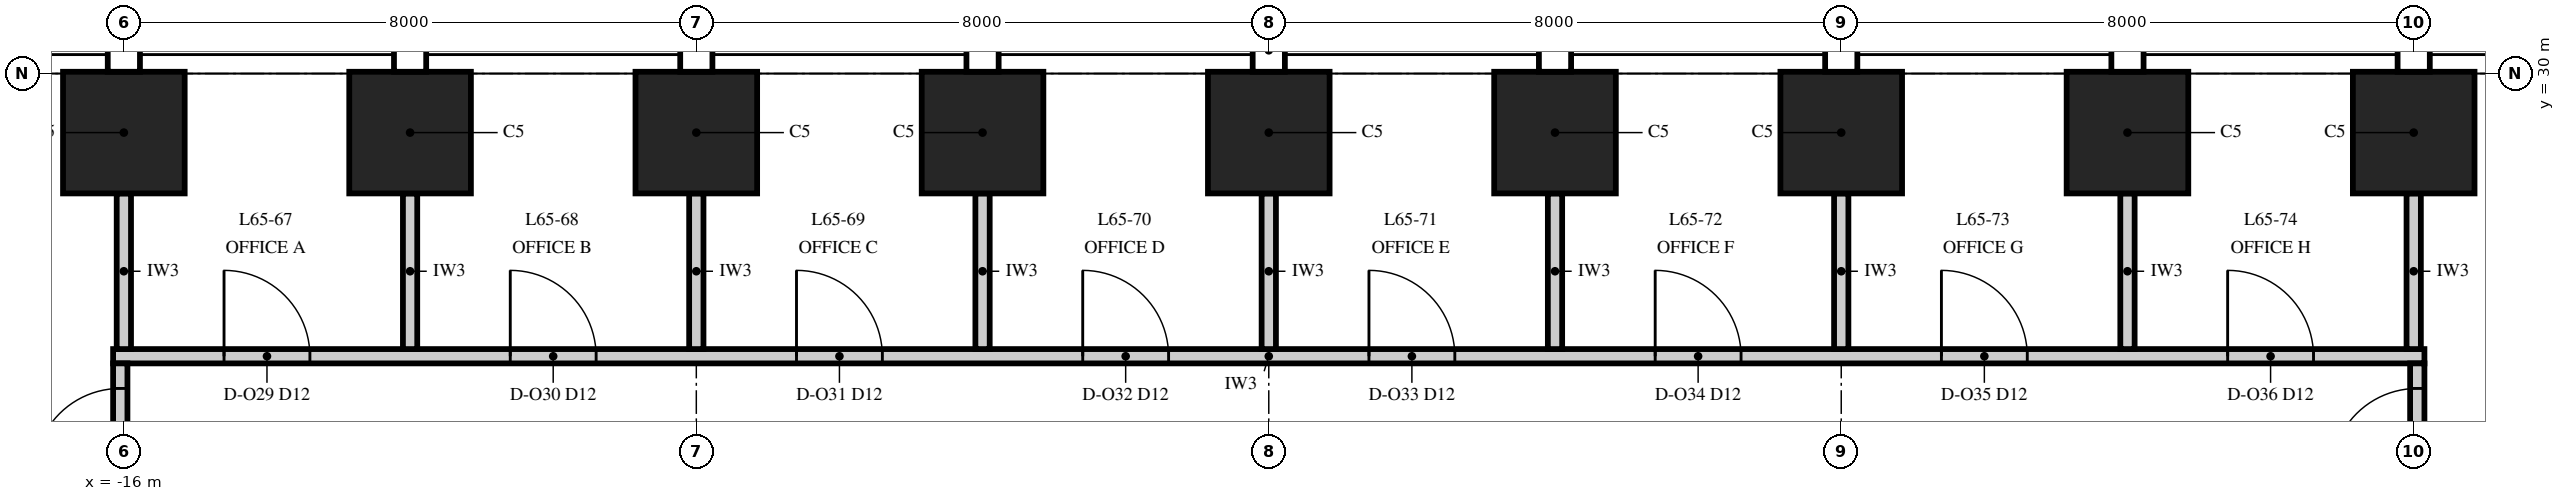
"""IFC4 building model, lengths in metres.
Left out: names, types, materials, properties, quantities, classifications, styles, units other than length and angle.
Written with IfcOpenShell. Run it as: python <this file> out.ifc"""

import sys

from ifc_helpers import new_model, si_unit, direction, frame, frame_2d, origin, origin_2d, place, context, subcontext, project, spatial, rectangle, extrude, element, fill, save


model = new_model("IFC4")
c1 = context("Model", 3, precision=1e-05, world=origin(), true_north=direction((0.0, 1.0)))
c2 = subcontext(c1, "Body", "Model", "MODEL_VIEW")
j1 = project(units=[si_unit("LENGTHUNIT", "METRE"), si_unit("PLANEANGLEUNIT", "RADIAN")], contexts=[c1])
p1 = place(None, origin())
s1 = spatial("IfcSite", under=j1, at=p1, CompositionType="ELEMENT")
p2 = place(p1, origin())
s2 = spatial("IfcBuilding", under=s1, at=p2, CompositionType="ELEMENT")
p3 = place(p2, frame((0.0, 0.0, 280.0)))
s3 = spatial("IfcBuildingStorey", under=s2, at=p3, CompositionType="ELEMENT", Elevation=280.0)
for number, where, z_axis, x_axis in (
    (1, (16.0, 29.175, 0.0), (0.0, 0.0, 1.0), (-1.0, 0.0, 0.0)),
    (2, (12.0, 29.175, 0.0), (0.0, 0.0, 1.0), (-1.0, 0.0, 0.0)),
    (3, (8.0, 29.175, 0.0), (0.0, 0.0, 1.0), (-1.0, 0.0, 0.0)),
    (4, (4.0, 29.175, 0.0), (0.0, 0.0, 1.0), (-1.0, 0.0, 0.0)),
    (5, (0.0, 29.175, 0.0), (0.0, 0.0, 1.0), (-1.0, 0.0, 0.0)),
    (6, (-4.0, 29.175, 0.0), (0.0, 0.0, 1.0), (-1.0, 0.0, 0.0)),
    (7, (-8.0, 29.175, 0.0), (0.0, 0.0, 1.0), (-1.0, 0.0, 0.0)),
    (8, (-12.0, 29.175, 0.0), (0.0, 0.0, 1.0), (-1.0, 0.0, 0.0)),
    (9, (-16.0, 29.175, 0.0), (0.0, 0.0, 1.0), (-1.0, 0.0, 0.0)),
):
    element("IfcColumn", number, at=place(p3, frame(where, z_axis=z_axis, x_axis=x_axis)), inside=s3, PredefinedType="COLUMN", context=c2, shape_type="SweptSolid", body=[
        extrude(rectangle(XDim=1.7, YDim=1.7, at=origin_2d()), origin(), (0.0, 0.0, 1.0), 4.0),
    ])
p4 = place(p3, frame((-16.15, 26.05, 0.0), z_axis=(0.0, 0.0, 1.0), x_axis=(1.0, 0.0, 0.0)))
e10 = element("IfcWall", 10, at=p4, inside=s3, PredefinedType="PARTITIONING", context=c2, shape_type="SweptSolid", body=[
    extrude(rectangle(XDim=32.3, YDim=0.2, at=frame_2d((16.15, 0.0))), origin(), (0.0, 0.0, 1.0), 3.418),
])
p5 = place(p4, frame((1.55, 0.0, 0.0)))
e11 = element("IfcOpeningElement", 11, at=p5, cuts=e10, PredefinedType="OPENING", context=c2, shape_type="SweptSolid", body=[
    extrude(rectangle(XDim=1.2, YDim=2.4, at=frame_2d((0.6, 1.2))), frame((0.0, 0.115, 0.0), z_axis=(0.0, -1.0, 0.0), x_axis=(1.0, 0.0, 0.0)), (0.0, 0.0, 1.0), 0.23),
])
p6 = place(p4, frame((5.55, 0.0, 0.0)))
e12 = element("IfcOpeningElement", 12, at=p6, cuts=e10, PredefinedType="OPENING", context=c2, shape_type="SweptSolid", body=[
    extrude(rectangle(XDim=1.2, YDim=2.4, at=frame_2d((0.6, 1.2))), frame((0.0, 0.115, 0.0), z_axis=(0.0, -1.0, 0.0), x_axis=(1.0, 0.0, 0.0)), (0.0, 0.0, 1.0), 0.23),
])
p7 = place(p4, frame((9.55, 0.0, 0.0)))
e13 = element("IfcOpeningElement", 13, at=p7, cuts=e10, PredefinedType="OPENING", context=c2, shape_type="SweptSolid", body=[
    extrude(rectangle(XDim=1.2, YDim=2.4, at=frame_2d((0.6, 1.2))), frame((0.0, 0.115, 0.0), z_axis=(0.0, -1.0, 0.0), x_axis=(1.0, 0.0, 0.0)), (0.0, 0.0, 1.0), 0.23),
])
p8 = place(p4, frame((13.55, 0.0, 0.0)))
e14 = element("IfcOpeningElement", 14, at=p8, cuts=e10, PredefinedType="OPENING", context=c2, shape_type="SweptSolid", body=[
    extrude(rectangle(XDim=1.2, YDim=2.4, at=frame_2d((0.6, 1.2))), frame((0.0, 0.115, 0.0), z_axis=(0.0, -1.0, 0.0), x_axis=(1.0, 0.0, 0.0)), (0.0, 0.0, 1.0), 0.23),
])
p9 = place(p4, frame((17.55, 0.0, 0.0)))
e15 = element("IfcOpeningElement", 15, at=p9, cuts=e10, PredefinedType="OPENING", context=c2, shape_type="SweptSolid", body=[
    extrude(rectangle(XDim=1.2, YDim=2.4, at=frame_2d((0.6, 1.2))), frame((0.0, 0.115, 0.0), z_axis=(0.0, -1.0, 0.0), x_axis=(1.0, 0.0, 0.0)), (0.0, 0.0, 1.0), 0.23),
])
p10 = place(p4, frame((21.55, 0.0, 0.0)))
e16 = element("IfcOpeningElement", 16, at=p10, cuts=e10, PredefinedType="OPENING", context=c2, shape_type="SweptSolid", body=[
    extrude(rectangle(XDim=1.2, YDim=2.4, at=frame_2d((0.6, 1.2))), frame((0.0, 0.115, 0.0), z_axis=(0.0, -1.0, 0.0), x_axis=(1.0, 0.0, 0.0)), (0.0, 0.0, 1.0), 0.23),
])
p11 = place(p4, frame((25.55, 0.0, 0.0)))
e17 = element("IfcOpeningElement", 17, at=p11, cuts=e10, PredefinedType="OPENING", context=c2, shape_type="SweptSolid", body=[
    extrude(rectangle(XDim=1.2, YDim=2.4, at=frame_2d((0.6, 1.2))), frame((0.0, 0.115, 0.0), z_axis=(0.0, -1.0, 0.0), x_axis=(1.0, 0.0, 0.0)), (0.0, 0.0, 1.0), 0.23),
])
p12 = place(p4, frame((29.55, 0.0, 0.0)))
e18 = element("IfcOpeningElement", 18, at=p12, cuts=e10, PredefinedType="OPENING", context=c2, shape_type="SweptSolid", body=[
    extrude(rectangle(XDim=1.2, YDim=2.4, at=frame_2d((0.6, 1.2))), frame((0.0, 0.115, 0.0), z_axis=(0.0, -1.0, 0.0), x_axis=(1.0, 0.0, 0.0)), (0.0, 0.0, 1.0), 0.23),
])
p13 = place(p3, frame((-16.05, 1.94, 0.0), z_axis=(0.0, 0.0, 1.0), x_axis=(0.0, 1.0, 0.0)))
e19 = element("IfcWall", 19, at=p13, inside=s3, PredefinedType="PARTITIONING", context=c2, shape_type="SweptSolid", body=[
    extrude(rectangle(XDim=24.01, YDim=0.2, at=frame_2d((12.005, 0.0))), origin(), (0.0, 0.0, 1.0), 2.842),
])
p14 = place(p13, frame((8.46, 0.0, 0.0)))
e20 = element("IfcOpeningElement", 20, at=p14, cuts=e19, PredefinedType="OPENING", context=c2, shape_type="SweptSolid", body=[
    extrude(rectangle(XDim=1.2, YDim=2.4, at=frame_2d((0.6, 1.2))), frame((0.0, 0.115, 0.0), z_axis=(0.0, -1.0, 0.0), x_axis=(1.0, 0.0, 0.0)), (0.0, 0.0, 1.0), 0.23),
])
p15 = place(p13, frame((22.46, 0.0, 0.0)))
e21 = element("IfcOpeningElement", 21, at=p15, cuts=e19, PredefinedType="OPENING", context=c2, shape_type="SweptSolid", body=[
    extrude(rectangle(XDim=1.2, YDim=2.4, at=frame_2d((0.6, 1.2))), frame((0.0, 0.115, 0.0), z_axis=(0.0, -1.0, 0.0), x_axis=(1.0, 0.0, 0.0)), (0.0, 0.0, 1.0), 0.23),
])
for number, where, z_axis, x_axis in (
    (22, (-16.0, 26.15, 0.0), (0.0, 0.0, 1.0), (0.0, 1.0, 0.0)),
    (23, (-12.0, 26.15, 0.0), (0.0, 0.0, 1.0), (0.0, 1.0, 0.0)),
    (24, (-8.0, 26.15, 0.0), (0.0, 0.0, 1.0), (0.0, 1.0, 0.0)),
    (25, (-4.0, 26.15, 0.0), (0.0, 0.0, 1.0), (0.0, 1.0, 0.0)),
    (26, (0.0, 26.15, 0.0), (0.0, 0.0, 1.0), (0.0, 1.0, 0.0)),
    (27, (4.0, 26.15, 0.0), (0.0, 0.0, 1.0), (0.0, 1.0, 0.0)),
    (28, (8.0, 26.15, 0.0), (0.0, 0.0, 1.0), (0.0, 1.0, 0.0)),
    (29, (12.0, 26.15, 0.0), (0.0, 0.0, 1.0), (0.0, 1.0, 0.0)),
    (30, (16.0, 26.15, 0.0), (0.0, 0.0, 1.0), (0.0, 1.0, 0.0)),
):
    element("IfcWall", number, at=place(p3, frame(where, z_axis=z_axis, x_axis=x_axis)), inside=s3, PredefinedType="PARTITIONING", context=c2, shape_type="SweptSolid", body=[
        extrude(rectangle(XDim=2.175, YDim=0.2, at=frame_2d((1.087, 0.0))), origin(), (0.0, 0.0, 1.0), 3.418),
    ])
p16 = place(p3, frame((16.05, 1.94, 0.0), z_axis=(0.0, 0.0, 1.0), x_axis=(0.0, 1.0, 0.0)))
e31 = element("IfcWall", 31, at=p16, inside=s3, PredefinedType="PARTITIONING", context=c2, shape_type="SweptSolid", body=[
    extrude(rectangle(XDim=24.01, YDim=0.2, at=frame_2d((12.005, 0.0))), origin(), (0.0, 0.0, 1.0), 2.842),
])
p17 = place(p16, frame((8.46, 0.0, 0.0)))
e32 = element("IfcOpeningElement", 32, at=p17, cuts=e31, PredefinedType="OPENING", context=c2, shape_type="SweptSolid", body=[
    extrude(rectangle(XDim=1.2, YDim=2.4, at=frame_2d((0.6, 1.2))), frame((0.0, 0.115, 0.0), z_axis=(0.0, -1.0, 0.0), x_axis=(1.0, 0.0, 0.0)), (0.0, 0.0, 1.0), 0.23),
])
p18 = place(p16, frame((22.46, 0.0, 0.0)))
e33 = element("IfcOpeningElement", 33, at=p18, cuts=e31, PredefinedType="OPENING", context=c2, shape_type="SweptSolid", body=[
    extrude(rectangle(XDim=1.2, YDim=2.4, at=frame_2d((0.6, 1.2))), frame((0.0, 0.115, 0.0), z_axis=(0.0, -1.0, 0.0), x_axis=(1.0, 0.0, 0.0)), (0.0, 0.0, 1.0), 0.23),
])
p19 = place(p5, origin())
e34 = element("IfcDoor", 34, at=p19, inside=s3, OperationType="SINGLE_SWING_LEFT", PredefinedType="DOOR", context=c2, shape_type="SweptSolid", body=[
    extrude(rectangle(XDim=1.2, YDim=2.4, at=frame_2d((0.6, 1.2))), frame((0.0, 0.1, 0.0), z_axis=(0.0, -1.0, 0.0), x_axis=(1.0, 0.0, 0.0)), (0.0, 0.0, 1.0), 0.199),
])
fill(e11, e34)
p20 = place(p6, origin())
e35 = element("IfcDoor", 35, at=p20, inside=s3, OperationType="SINGLE_SWING_LEFT", PredefinedType="DOOR", context=c2, shape_type="SweptSolid", body=[
    extrude(rectangle(XDim=1.2, YDim=2.4, at=frame_2d((0.6, 1.2))), frame((0.0, 0.1, 0.0), z_axis=(0.0, -1.0, 0.0), x_axis=(1.0, 0.0, 0.0)), (0.0, 0.0, 1.0), 0.199),
])
fill(e12, e35)
p21 = place(p7, origin())
e36 = element("IfcDoor", 36, at=p21, inside=s3, OperationType="SINGLE_SWING_LEFT", PredefinedType="DOOR", context=c2, shape_type="SweptSolid", body=[
    extrude(rectangle(XDim=1.2, YDim=2.4, at=frame_2d((0.6, 1.2))), frame((0.0, 0.1, 0.0), z_axis=(0.0, -1.0, 0.0), x_axis=(1.0, 0.0, 0.0)), (0.0, 0.0, 1.0), 0.199),
])
fill(e13, e36)
p22 = place(p8, origin())
e37 = element("IfcDoor", 37, at=p22, inside=s3, OperationType="SINGLE_SWING_LEFT", PredefinedType="DOOR", context=c2, shape_type="SweptSolid", body=[
    extrude(rectangle(XDim=1.2, YDim=2.4, at=frame_2d((0.6, 1.2))), frame((0.0, 0.1, 0.0), z_axis=(0.0, -1.0, 0.0), x_axis=(1.0, 0.0, 0.0)), (0.0, 0.0, 1.0), 0.199),
])
fill(e14, e37)
p23 = place(p9, origin())
e38 = element("IfcDoor", 38, at=p23, inside=s3, OperationType="SINGLE_SWING_LEFT", PredefinedType="DOOR", context=c2, shape_type="SweptSolid", body=[
    extrude(rectangle(XDim=1.2, YDim=2.4, at=frame_2d((0.6, 1.2))), frame((0.0, 0.1, 0.0), z_axis=(0.0, -1.0, 0.0), x_axis=(1.0, 0.0, 0.0)), (0.0, 0.0, 1.0), 0.199),
])
fill(e15, e38)
p24 = place(p10, origin())
e39 = element("IfcDoor", 39, at=p24, inside=s3, OperationType="SINGLE_SWING_LEFT", PredefinedType="DOOR", context=c2, shape_type="SweptSolid", body=[
    extrude(rectangle(XDim=1.2, YDim=2.4, at=frame_2d((0.6, 1.2))), frame((0.0, 0.1, 0.0), z_axis=(0.0, -1.0, 0.0), x_axis=(1.0, 0.0, 0.0)), (0.0, 0.0, 1.0), 0.199),
])
fill(e16, e39)
p25 = place(p11, origin())
e40 = element("IfcDoor", 40, at=p25, inside=s3, OperationType="SINGLE_SWING_LEFT", PredefinedType="DOOR", context=c2, shape_type="SweptSolid", body=[
    extrude(rectangle(XDim=1.2, YDim=2.4, at=frame_2d((0.6, 1.2))), frame((0.0, 0.1, 0.0), z_axis=(0.0, -1.0, 0.0), x_axis=(1.0, 0.0, 0.0)), (0.0, 0.0, 1.0), 0.199),
])
fill(e17, e40)
p26 = place(p12, origin())
e41 = element("IfcDoor", 41, at=p26, inside=s3, OperationType="SINGLE_SWING_LEFT", PredefinedType="DOOR", context=c2, shape_type="SweptSolid", body=[
    extrude(rectangle(XDim=1.2, YDim=2.4, at=frame_2d((0.6, 1.2))), frame((0.0, 0.1, 0.0), z_axis=(0.0, -1.0, 0.0), x_axis=(1.0, 0.0, 0.0)), (0.0, 0.0, 1.0), 0.199),
])
fill(e18, e41)
p27 = place(p15, origin())
e42 = element("IfcDoor", 42, at=p27, inside=s3, OperationType="SINGLE_SWING_LEFT", PredefinedType="DOOR", context=c2, shape_type="SweptSolid", body=[
    extrude(rectangle(XDim=1.2, YDim=2.4, at=frame_2d((0.6, 1.2))), frame((0.0, 0.1, 0.0), z_axis=(0.0, -1.0, 0.0), x_axis=(1.0, 0.0, 0.0)), (0.0, 0.0, 1.0), 0.199),
])
fill(e21, e42)
p28 = place(p18, origin())
e43 = element("IfcDoor", 43, at=p28, inside=s3, OperationType="SINGLE_SWING_LEFT", PredefinedType="DOOR", context=c2, shape_type="SweptSolid", body=[
    extrude(rectangle(XDim=1.2, YDim=2.4, at=frame_2d((0.6, 1.2))), frame((0.0, 0.1, 0.0), z_axis=(0.0, -1.0, 0.0), x_axis=(1.0, 0.0, 0.0)), (0.0, 0.0, 1.0), 0.199),
])
fill(e33, e43)
save(model, sys.argv[1])
